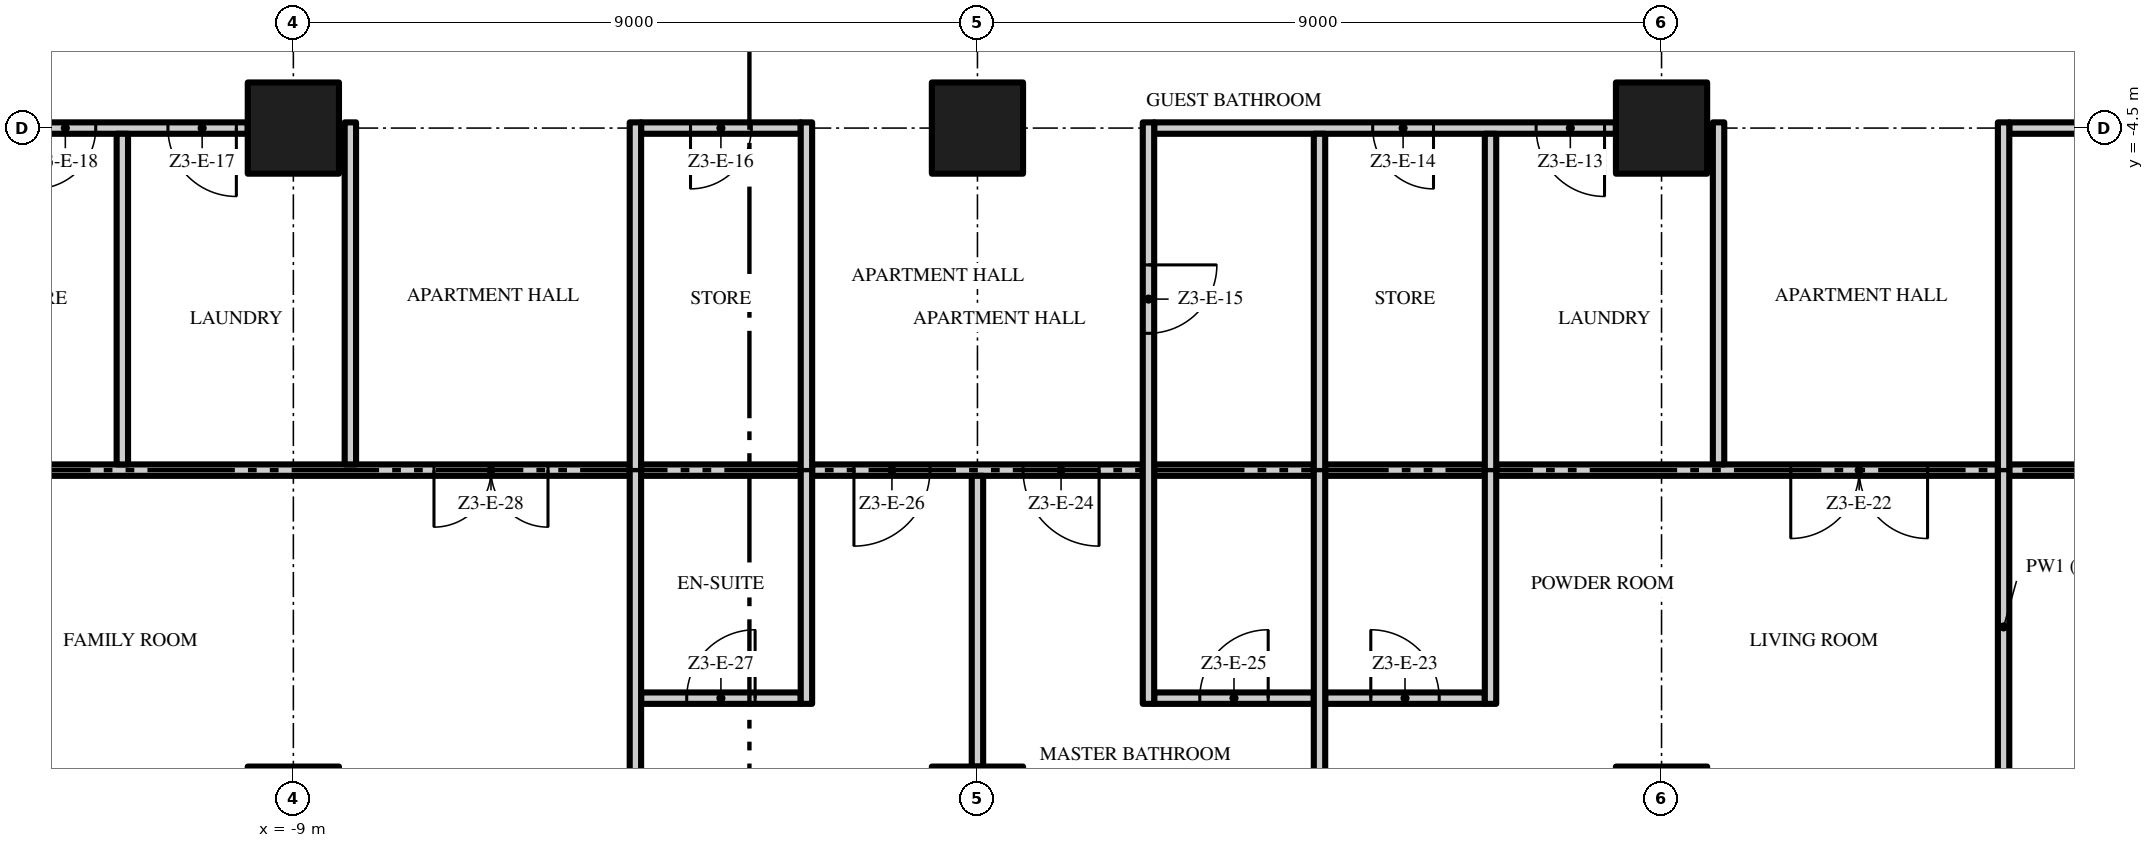
"""IFC4 building model, lengths in metres.
Left out: names, types, materials, properties, quantities, classifications, styles, units other than length and angle.
Written with IfcOpenShell. Run it as: python <this file> out.ifc"""

import sys

from ifc_helpers import new_model, si_unit, direction, frame, frame_2d, origin, origin_2d, place, context, subcontext, project, spatial, rectangle, extrude, element, fill, save


model = new_model("IFC4")
c1 = context("Model", 3, precision=1e-05, world=origin(), true_north=direction((0.0, 1.0)))
c2 = subcontext(c1, "Body", "Model", "MODEL_VIEW")
j1 = project(units=[si_unit("LENGTHUNIT", "METRE"), si_unit("PLANEANGLEUNIT", "RADIAN")], contexts=[c1])
p1 = place(None, origin())
s1 = spatial("IfcSite", under=j1, at=p1, CompositionType="ELEMENT")
p2 = place(p1, origin())
s2 = spatial("IfcBuilding", under=s1, at=p2, CompositionType="ELEMENT")
p3 = place(p2, frame((0.0, 0.0, 170.6)))
s3 = spatial("IfcBuildingStorey", under=s2, at=p3, CompositionType="ELEMENT", Elevation=170.6)
for number, where, z_axis, x_axis in (
    (1, (-9.0, -13.5, 0.0), (0.0, 0.0, 1.0), (1.0, 0.0, 0.0)),
    (2, (-9.0, -4.5, 0.0), (0.0, 0.0, 1.0), (1.0, 0.0, 0.0)),
    (3, (0.0, -13.5, 0.0), (0.0, 0.0, 1.0), (1.0, 0.0, 0.0)),
    (4, (0.0, -4.5, 0.0), (0.0, 0.0, 1.0), (1.0, 0.0, 0.0)),
    (5, (9.0, -13.5, 0.0), (0.0, 0.0, 1.0), (1.0, 0.0, 0.0)),
    (6, (9.0, -4.5, 0.0), (0.0, 0.0, 1.0), (1.0, 0.0, 0.0)),
):
    element("IfcColumn", number, at=place(p3, frame(where, z_axis=z_axis, x_axis=x_axis)), inside=s3, PredefinedType="COLUMN", context=c2, shape_type="SweptSolid", body=[
        extrude(rectangle(XDim=1.2, YDim=1.2, at=origin_2d()), origin(), (0.0, 0.0, 1.0), 3.5),
    ])
p4 = place(p3, frame((-4.425, -12.0, 0.0), z_axis=(0.0, 0.0, 1.0), x_axis=(1.0, 0.0, 0.0)))
e7 = element("IfcWall", 7, at=p4, inside=s3, PredefinedType="PARTITIONING", context=c2, shape_type="SweptSolid", body=[
    extrude(rectangle(XDim=2.1, YDim=0.15, at=frame_2d((1.05, 0.0))), origin(), (0.0, 0.0, 1.0), 3.5),
])
p5 = place(p4, frame((0.6, 0.0, 0.0)))
e8 = element("IfcOpeningElement", 8, at=p5, cuts=e7, PredefinedType="OPENING", context=c2, shape_type="SweptSolid", body=[
    extrude(rectangle(XDim=0.9, YDim=2.1, at=frame_2d((0.45, 1.05))), frame((0.0, 0.085, 0.0), z_axis=(0.0, -1.0, 0.0), x_axis=(1.0, 0.0, 0.0)), (0.0, 0.0, 1.0), 0.17),
])
p6 = place(p3, frame((2.325, -12.0, 0.0), z_axis=(0.0, 0.0, 1.0), x_axis=(1.0, 0.0, 0.0)))
e9 = element("IfcWall", 9, at=p6, inside=s3, PredefinedType="PARTITIONING", context=c2, shape_type="SweptSolid", body=[
    extrude(rectangle(XDim=2.1, YDim=0.15, at=frame_2d((1.05, 0.0))), origin(), (0.0, 0.0, 1.0), 3.5),
])
p7 = place(p6, frame((0.6, 0.0, 0.0)))
e10 = element("IfcOpeningElement", 10, at=p7, cuts=e9, PredefinedType="OPENING", context=c2, shape_type="SweptSolid", body=[
    extrude(rectangle(XDim=0.9, YDim=2.1, at=frame_2d((0.45, 1.05))), frame((0.0, 0.085, 0.0), z_axis=(0.0, -1.0, 0.0), x_axis=(1.0, 0.0, 0.0)), (0.0, 0.0, 1.0), 0.17),
])
p8 = place(p3, frame((4.575, -12.0, 0.0), z_axis=(0.0, 0.0, 1.0), x_axis=(1.0, 0.0, 0.0)))
e11 = element("IfcWall", 11, at=p8, inside=s3, PredefinedType="PARTITIONING", context=c2, shape_type="SweptSolid", body=[
    extrude(rectangle(XDim=2.1, YDim=0.15, at=frame_2d((1.05, 0.0))), origin(), (0.0, 0.0, 1.0), 3.5),
])
p9 = place(p8, frame((0.6, 0.0, 0.0)))
e12 = element("IfcOpeningElement", 12, at=p9, cuts=e11, PredefinedType="OPENING", context=c2, shape_type="SweptSolid", body=[
    extrude(rectangle(XDim=0.9, YDim=2.1, at=frame_2d((0.45, 1.05))), frame((0.0, 0.085, 0.0), z_axis=(0.0, -1.0, 0.0), x_axis=(1.0, 0.0, 0.0)), (0.0, 0.0, 1.0), 0.17),
])
p10 = place(p3, frame((-4.575, -9.0, 0.0), z_axis=(0.0, 0.0, 1.0), x_axis=(-1.0, 0.0, 0.0)))
e13 = element("IfcWall", 13, at=p10, inside=s3, PredefinedType="PARTITIONING", context=c2, shape_type="SweptSolid", body=[
    extrude(rectangle(XDim=8.85, YDim=0.15, at=frame_2d((4.425, 0.0))), origin(), (0.0, 0.0, 1.0), 3.5),
])
p11 = place(p10, frame((1.075, 0.0, 0.0)))
e14 = element("IfcOpeningElement", 14, at=p11, cuts=e13, PredefinedType="OPENING", context=c2, shape_type="SweptSolid", body=[
    extrude(rectangle(XDim=1.5, YDim=2.4, at=frame_2d((0.75, 1.2))), frame((0.0, 0.085, 0.0), z_axis=(0.0, -1.0, 0.0), x_axis=(1.0, 0.0, 0.0)), (0.0, 0.0, 1.0), 0.17),
])
p12 = place(p3, frame((-4.425, -9.0, 0.0), z_axis=(0.0, 0.0, 1.0), x_axis=(1.0, 0.0, 0.0)))
e15 = element("IfcWall", 15, at=p12, inside=s3, PredefinedType="PARTITIONING", context=c2, shape_type="SweptSolid", body=[
    extrude(rectangle(XDim=2.1, YDim=0.15, at=frame_2d((1.05, 0.0))), origin(), (0.0, 0.0, 1.0), 3.5),
])
p13 = place(p3, frame((2.175, -9.0, 0.0), z_axis=(0.0, 0.0, 1.0), x_axis=(-1.0, 0.0, 0.0)))
e16 = element("IfcWall", 16, at=p13, inside=s3, PredefinedType="PARTITIONING", context=c2, shape_type="SweptSolid", body=[
    extrude(rectangle(XDim=4.35, YDim=0.15, at=frame_2d((2.175, 0.0))), origin(), (0.0, 0.0, 1.0), 3.5),
])
p14 = place(p13, frame((0.575, 0.0, 0.0)))
e17 = element("IfcOpeningElement", 17, at=p14, cuts=e16, PredefinedType="OPENING", context=c2, shape_type="SweptSolid", body=[
    extrude(rectangle(XDim=1.0, YDim=2.4, at=frame_2d((0.5, 1.2))), frame((0.0, 0.085, 0.0), z_axis=(0.0, -1.0, 0.0), x_axis=(1.0, 0.0, 0.0)), (0.0, 0.0, 1.0), 0.17),
])
p15 = place(p13, frame((2.8, 0.0, 0.0)))
e18 = element("IfcOpeningElement", 18, at=p15, cuts=e16, PredefinedType="OPENING", context=c2, shape_type="SweptSolid", body=[
    extrude(rectangle(XDim=1.0, YDim=2.4, at=frame_2d((0.5, 1.2))), frame((0.0, 0.085, 0.0), z_axis=(0.0, -1.0, 0.0), x_axis=(1.0, 0.0, 0.0)), (0.0, 0.0, 1.0), 0.17),
])
for number, where, z_axis, x_axis in (
    (19, (2.325, -9.0, 0.0), (0.0, 0.0, 1.0), (1.0, 0.0, 0.0)),
    (20, (4.575, -9.0, 0.0), (0.0, 0.0, 1.0), (1.0, 0.0, 0.0)),
):
    element("IfcWall", number, at=place(p3, frame(where, z_axis=z_axis, x_axis=x_axis)), inside=s3, PredefinedType="PARTITIONING", context=c2, shape_type="SweptSolid", body=[
        extrude(rectangle(XDim=2.1, YDim=0.15, at=frame_2d((1.05, 0.0))), origin(), (0.0, 0.0, 1.0), 3.5),
    ])
p16 = place(p3, frame((13.425, -9.0, 0.0), z_axis=(0.0, 0.0, 1.0), x_axis=(-1.0, 0.0, 0.0)))
e21 = element("IfcWall", 21, at=p16, inside=s3, PredefinedType="PARTITIONING", context=c2, shape_type="SweptSolid", body=[
    extrude(rectangle(XDim=6.6, YDim=0.15, at=frame_2d((3.3, 0.0))), origin(), (0.0, 0.0, 1.0), 3.5),
])
p17 = place(p16, frame((0.925, 0.0, 0.0)))
e22 = element("IfcOpeningElement", 22, at=p17, cuts=e21, PredefinedType="OPENING", context=c2, shape_type="SweptSolid", body=[
    extrude(rectangle(XDim=1.8, YDim=2.4, at=frame_2d((0.9, 1.2))), frame((0.0, 0.085, 0.0), z_axis=(0.0, -1.0, 0.0), x_axis=(1.0, 0.0, 0.0)), (0.0, 0.0, 1.0), 0.17),
])
p18 = place(p3, frame((22.2, -9.0, 0.0), z_axis=(0.0, 0.0, 1.0), x_axis=(-1.0, 0.0, 0.0)))
e23 = element("IfcWall", 23, at=p18, inside=s3, PredefinedType="PARTITIONING", context=c2, shape_type="SweptSolid", body=[
    extrude(rectangle(XDim=8.625, YDim=0.15, at=frame_2d((4.312, 0.0))), origin(), (0.0, 0.0, 1.0), 3.5),
])
p19 = place(p18, frame((0.8, 0.0, 0.0)))
e24 = element("IfcOpeningElement", 24, at=p19, cuts=e23, PredefinedType="OPENING", context=c2, shape_type="SweptSolid", body=[
    extrude(rectangle(XDim=1.5, YDim=2.4, at=frame_2d((0.75, 1.2))), frame((0.0, 0.085, 0.0), z_axis=(0.0, -1.0, 0.0), x_axis=(1.0, 0.0, 0.0)), (0.0, 0.0, 1.0), 0.17),
])
p20 = place(p3, frame((-9.6, -4.5, 0.0), z_axis=(0.0, 0.0, 1.0), x_axis=(-1.0, 0.0, 0.0)))
e25 = element("IfcWall", 25, at=p20, inside=s3, PredefinedType="PARTITIONING", context=c2, shape_type="SweptSolid", body=[
    extrude(rectangle(XDim=3.825, YDim=0.15, at=frame_2d((1.913, 0.0))), origin(), (0.0, 0.0, 1.0), 3.5),
])
p21 = place(p20, frame((0.15, 0.0, 0.0)))
e26 = element("IfcOpeningElement", 26, at=p21, cuts=e25, PredefinedType="OPENING", context=c2, shape_type="SweptSolid", body=[
    extrude(rectangle(XDim=0.9, YDim=2.1, at=frame_2d((0.45, 1.05))), frame((0.0, 0.085, 0.0), z_axis=(0.0, -1.0, 0.0), x_axis=(1.0, 0.0, 0.0)), (0.0, 0.0, 1.0), 0.17),
])
p22 = place(p20, frame((2.0, 0.0, 0.0)))
e27 = element("IfcOpeningElement", 27, at=p22, cuts=e25, PredefinedType="OPENING", context=c2, shape_type="SweptSolid", body=[
    extrude(rectangle(XDim=0.8, YDim=2.0, at=frame_2d((0.4, 1.0))), frame((0.0, 0.085, 0.0), z_axis=(0.0, -1.0, 0.0), x_axis=(1.0, 0.0, 0.0)), (0.0, 0.0, 1.0), 0.17),
])
p23 = place(p3, frame((-2.325, -4.5, 0.0), z_axis=(0.0, 0.0, 1.0), x_axis=(-1.0, 0.0, 0.0)))
e28 = element("IfcWall", 28, at=p23, inside=s3, PredefinedType="PARTITIONING", context=c2, shape_type="SweptSolid", body=[
    extrude(rectangle(XDim=2.1, YDim=0.15, at=frame_2d((1.05, 0.0))), origin(), (0.0, 0.0, 1.0), 3.5),
])
p24 = place(p23, frame((0.65, 0.0, 0.0)))
e29 = element("IfcOpeningElement", 29, at=p24, cuts=e28, PredefinedType="OPENING", context=c2, shape_type="SweptSolid", body=[
    extrude(rectangle(XDim=0.8, YDim=2.0, at=frame_2d((0.4, 1.0))), frame((0.0, 0.085, 0.0), z_axis=(0.0, -1.0, 0.0), x_axis=(1.0, 0.0, 0.0)), (0.0, 0.0, 1.0), 0.17),
])
p25 = place(p3, frame((8.4, -4.5, 0.0), z_axis=(0.0, 0.0, 1.0), x_axis=(-1.0, 0.0, 0.0)))
e30 = element("IfcWall", 30, at=p25, inside=s3, PredefinedType="PARTITIONING", context=c2, shape_type="SweptSolid", body=[
    extrude(rectangle(XDim=6.075, YDim=0.15, at=frame_2d((3.038, 0.0))), origin(), (0.0, 0.0, 1.0), 3.5),
])
p26 = place(p25, frame((0.15, 0.0, 0.0)))
e31 = element("IfcOpeningElement", 31, at=p26, cuts=e30, PredefinedType="OPENING", context=c2, shape_type="SweptSolid", body=[
    extrude(rectangle(XDim=0.9, YDim=2.1, at=frame_2d((0.45, 1.05))), frame((0.0, 0.085, 0.0), z_axis=(0.0, -1.0, 0.0), x_axis=(1.0, 0.0, 0.0)), (0.0, 0.0, 1.0), 0.17),
])
p27 = place(p25, frame((2.4, 0.0, 0.0)))
e32 = element("IfcOpeningElement", 32, at=p27, cuts=e30, PredefinedType="OPENING", context=c2, shape_type="SweptSolid", body=[
    extrude(rectangle(XDim=0.8, YDim=2.0, at=frame_2d((0.4, 1.0))), frame((0.0, 0.085, 0.0), z_axis=(0.0, -1.0, 0.0), x_axis=(1.0, 0.0, 0.0)), (0.0, 0.0, 1.0), 0.17),
])
p28 = place(p3, frame((17.4, -4.5, 0.0), z_axis=(0.0, 0.0, 1.0), x_axis=(-1.0, 0.0, 0.0)))
e33 = element("IfcWall", 33, at=p28, inside=s3, PredefinedType="PARTITIONING", context=c2, shape_type="SweptSolid", body=[
    extrude(rectangle(XDim=3.825, YDim=0.15, at=frame_2d((1.913, 0.0))), origin(), (0.0, 0.0, 1.0), 3.5),
])
p29 = place(p28, frame((0.775, 0.0, 0.0)))
e34 = element("IfcOpeningElement", 34, at=p29, cuts=e33, PredefinedType="OPENING", context=c2, shape_type="SweptSolid", body=[
    extrude(rectangle(XDim=1.0, YDim=2.4, at=frame_2d((0.5, 1.2))), frame((0.0, 0.085, 0.0), z_axis=(0.0, -1.0, 0.0), x_axis=(1.0, 0.0, 0.0)), (0.0, 0.0, 1.0), 0.17),
])
p30 = place(p3, frame((-11.25, -8.925, 0.0), z_axis=(0.0, 0.0, 1.0), x_axis=(0.0, 1.0, 0.0)))
e35 = element("IfcWall", 35, at=p30, inside=s3, PredefinedType="PARTITIONING", context=c2, shape_type="SweptSolid", body=[
    extrude(rectangle(XDim=4.35, YDim=0.15, at=frame_2d((2.175, 0.0))), origin(), (0.0, 0.0, 1.0), 3.5),
])
p31 = place(p3, frame((-8.25, -8.925, 0.0), z_axis=(0.0, 0.0, 1.0), x_axis=(0.0, 1.0, 0.0)))
e36 = element("IfcWall", 36, at=p31, inside=s3, PredefinedType="PARTITIONING", context=c2, shape_type="SweptSolid", body=[
    extrude(rectangle(XDim=4.5, YDim=0.15, at=frame_2d((2.25, 0.0))), origin(), (0.0, 0.0, 1.0), 3.5),
])
p32 = place(p3, frame((-4.5, -17.7, 0.0), z_axis=(0.0, 0.0, 1.0), x_axis=(0.0, 1.0, 0.0)))
e37 = element("IfcWall", 37, at=p32, inside=s3, PredefinedType="PARTITIONING", context=c2, shape_type="SweptSolid", body=[
    extrude(rectangle(XDim=13.275, YDim=0.15, at=frame_2d((6.638, 0.0))), origin(), (0.0, 0.0, 1.0), 3.5),
])
p33 = place(p3, frame((-2.25, -12.075, 0.0), z_axis=(0.0, 0.0, 1.0), x_axis=(0.0, 1.0, 0.0)))
e38 = element("IfcWall", 38, at=p33, inside=s3, PredefinedType="PARTITIONING", context=c2, shape_type="SweptSolid", body=[
    extrude(rectangle(XDim=7.65, YDim=0.15, at=frame_2d((3.825, 0.0))), origin(), (0.0, 0.0, 1.0), 3.5),
])
p34 = place(p3, frame((0.0, -12.9, 0.0), z_axis=(0.0, 0.0, 1.0), x_axis=(0.0, 1.0, 0.0)))
e39 = element("IfcWall", 39, at=p34, inside=s3, PredefinedType="PARTITIONING", context=c2, shape_type="SweptSolid", body=[
    extrude(rectangle(XDim=3.825, YDim=0.15, at=frame_2d((1.913, 0.0))), origin(), (0.0, 0.0, 1.0), 3.5),
])
p35 = place(p3, frame((2.25, -4.425, 0.0), z_axis=(0.0, 0.0, 1.0), x_axis=(0.0, -1.0, 0.0)))
e40 = element("IfcWall", 40, at=p35, inside=s3, PredefinedType="PARTITIONING", context=c2, shape_type="SweptSolid", body=[
    extrude(rectangle(XDim=7.65, YDim=0.15, at=frame_2d((3.825, 0.0))), origin(), (0.0, 0.0, 1.0), 3.5),
])
p36 = place(p35, frame((1.875, 0.0, 0.0)))
e41 = element("IfcOpeningElement", 41, at=p36, cuts=e40, PredefinedType="OPENING", context=c2, shape_type="SweptSolid", body=[
    extrude(rectangle(XDim=0.9, YDim=2.1, at=frame_2d((0.45, 1.05))), frame((0.0, 0.085, 0.0), z_axis=(0.0, -1.0, 0.0), x_axis=(1.0, 0.0, 0.0)), (0.0, 0.0, 1.0), 0.17),
])
p37 = place(p3, frame((4.5, -17.7, 0.0), z_axis=(0.0, 0.0, 1.0), x_axis=(0.0, 1.0, 0.0)))
e42 = element("IfcWall", 42, at=p37, inside=s3, PredefinedType="PARTITIONING", context=c2, shape_type="SweptSolid", body=[
    extrude(rectangle(XDim=13.125, YDim=0.15, at=frame_2d((6.562, 0.0))), origin(), (0.0, 0.0, 1.0), 3.5),
])
p38 = place(p3, frame((6.75, -12.075, 0.0), z_axis=(0.0, 0.0, 1.0), x_axis=(0.0, 1.0, 0.0)))
e43 = element("IfcWall", 43, at=p38, inside=s3, PredefinedType="PARTITIONING", context=c2, shape_type="SweptSolid", body=[
    extrude(rectangle(XDim=7.5, YDim=0.15, at=frame_2d((3.75, 0.0))), origin(), (0.0, 0.0, 1.0), 3.5),
])
p39 = place(p3, frame((9.75, -8.925, 0.0), z_axis=(0.0, 0.0, 1.0), x_axis=(0.0, 1.0, 0.0)))
e44 = element("IfcWall", 44, at=p39, inside=s3, PredefinedType="PARTITIONING", context=c2, shape_type="SweptSolid", body=[
    extrude(rectangle(XDim=4.5, YDim=0.15, at=frame_2d((2.25, 0.0))), origin(), (0.0, 0.0, 1.0), 3.5),
])
p40 = place(p3, frame((13.5, -17.7, 0.0), z_axis=(0.0, 0.0, 1.0), x_axis=(0.0, 1.0, 0.0)))
e45 = element("IfcWall", 45, at=p40, inside=s3, PredefinedType="PARTITIONING", context=c2, shape_type="SweptSolid", body=[
    extrude(rectangle(XDim=13.275, YDim=0.15, at=frame_2d((6.638, 0.0))), origin(), (0.0, 0.0, 1.0), 3.5),
])
p41 = place(p26, origin())
e46 = element("IfcDoor", 46, at=p41, inside=s3, OperationType="SINGLE_SWING_LEFT", PredefinedType="DOOR", context=c2, shape_type="SweptSolid", body=[
    extrude(rectangle(XDim=0.9, YDim=2.1, at=frame_2d((0.45, 1.05))), frame((0.0, 0.025, 0.0), z_axis=(0.0, -1.0, 0.0), x_axis=(1.0, 0.0, 0.0)), (0.0, 0.0, 1.0), 0.05),
])
fill(e31, e46)
p42 = place(p27, origin())
e47 = element("IfcDoor", 47, at=p42, inside=s3, OperationType="SINGLE_SWING_LEFT", PredefinedType="DOOR", context=c2, shape_type="SweptSolid", body=[
    extrude(rectangle(XDim=0.8, YDim=2.0, at=frame_2d((0.4, 1.0))), frame((0.0, 0.025, 0.0), z_axis=(0.0, -1.0, 0.0), x_axis=(1.0, 0.0, 0.0)), (0.0, 0.0, 1.0), 0.05),
])
fill(e32, e47)
p43 = place(p36, origin())
e48 = element("IfcDoor", 48, at=p43, inside=s3, OperationType="SINGLE_SWING_LEFT", PredefinedType="DOOR", context=c2, shape_type="SweptSolid", body=[
    extrude(rectangle(XDim=0.9, YDim=2.1, at=frame_2d((0.45, 1.05))), frame((0.0, 0.025, 0.0), z_axis=(0.0, -1.0, 0.0), x_axis=(1.0, 0.0, 0.0)), (0.0, 0.0, 1.0), 0.05),
])
fill(e41, e48)
p44 = place(p24, origin())
e49 = element("IfcDoor", 49, at=p44, inside=s3, OperationType="SINGLE_SWING_RIGHT", PredefinedType="DOOR", context=c2, shape_type="SweptSolid", body=[
    extrude(rectangle(XDim=0.8, YDim=2.0, at=frame_2d((0.4, 1.0))), frame((0.0, 0.025, 0.0), z_axis=(0.0, -1.0, 0.0), x_axis=(1.0, 0.0, 0.0)), (0.0, 0.0, 1.0), 0.05),
])
fill(e29, e49)
p45 = place(p21, origin())
e50 = element("IfcDoor", 50, at=p45, inside=s3, OperationType="SINGLE_SWING_LEFT", PredefinedType="DOOR", context=c2, shape_type="SweptSolid", body=[
    extrude(rectangle(XDim=0.9, YDim=2.1, at=frame_2d((0.45, 1.05))), frame((0.0, 0.025, 0.0), z_axis=(0.0, -1.0, 0.0), x_axis=(1.0, 0.0, 0.0)), (0.0, 0.0, 1.0), 0.05),
])
fill(e26, e50)
p46 = place(p22, origin())
e51 = element("IfcDoor", 51, at=p46, inside=s3, OperationType="SINGLE_SWING_RIGHT", PredefinedType="DOOR", context=c2, shape_type="SweptSolid", body=[
    extrude(rectangle(XDim=0.8, YDim=2.0, at=frame_2d((0.4, 1.0))), frame((0.0, 0.025, 0.0), z_axis=(0.0, -1.0, 0.0), x_axis=(1.0, 0.0, 0.0)), (0.0, 0.0, 1.0), 0.05),
])
fill(e27, e51)
p47 = place(p17, origin())
e52 = element("IfcDoor", 52, at=p47, inside=s3, OperationType="DOUBLE_DOOR_SINGLE_SWING", PredefinedType="DOOR", context=c2, shape_type="SweptSolid", body=[
    extrude(rectangle(XDim=1.8, YDim=2.4, at=frame_2d((0.9, 1.2))), frame((0.0, 0.025, 0.0), z_axis=(0.0, -1.0, 0.0), x_axis=(1.0, 0.0, 0.0)), (0.0, 0.0, 1.0), 0.05),
])
fill(e22, e52)
p48 = place(p9, origin())
e53 = element("IfcDoor", 53, at=p48, inside=s3, OperationType="SINGLE_SWING_LEFT", PredefinedType="DOOR", context=c2, shape_type="SweptSolid", body=[
    extrude(rectangle(XDim=0.9, YDim=2.1, at=frame_2d((0.45, 1.05))), frame((0.0, 0.025, 0.0), z_axis=(0.0, -1.0, 0.0), x_axis=(1.0, 0.0, 0.0)), (0.0, 0.0, 1.0), 0.05),
])
fill(e12, e53)
p49 = place(p14, origin())
e54 = element("IfcDoor", 54, at=p49, inside=s3, OperationType="SINGLE_SWING_LEFT", PredefinedType="DOOR", context=c2, shape_type="SweptSolid", body=[
    extrude(rectangle(XDim=1.0, YDim=2.4, at=frame_2d((0.5, 1.2))), frame((0.0, 0.025, 0.0), z_axis=(0.0, -1.0, 0.0), x_axis=(1.0, 0.0, 0.0)), (0.0, 0.0, 1.0), 0.05),
])
fill(e17, e54)
p50 = place(p7, origin())
e55 = element("IfcDoor", 55, at=p50, inside=s3, OperationType="SINGLE_SWING_RIGHT", PredefinedType="DOOR", context=c2, shape_type="SweptSolid", body=[
    extrude(rectangle(XDim=0.9, YDim=2.1, at=frame_2d((0.45, 1.05))), frame((0.0, 0.025, 0.0), z_axis=(0.0, -1.0, 0.0), x_axis=(1.0, 0.0, 0.0)), (0.0, 0.0, 1.0), 0.05),
])
fill(e10, e55)
p51 = place(p15, origin())
e56 = element("IfcDoor", 56, at=p51, inside=s3, OperationType="SINGLE_SWING_RIGHT", PredefinedType="DOOR", context=c2, shape_type="SweptSolid", body=[
    extrude(rectangle(XDim=1.0, YDim=2.4, at=frame_2d((0.5, 1.2))), frame((0.0, 0.025, 0.0), z_axis=(0.0, -1.0, 0.0), x_axis=(1.0, 0.0, 0.0)), (0.0, 0.0, 1.0), 0.05),
])
fill(e18, e56)
p52 = place(p5, origin())
e57 = element("IfcDoor", 57, at=p52, inside=s3, OperationType="SINGLE_SWING_RIGHT", PredefinedType="DOOR", context=c2, shape_type="SweptSolid", body=[
    extrude(rectangle(XDim=0.9, YDim=2.1, at=frame_2d((0.45, 1.05))), frame((0.0, 0.025, 0.0), z_axis=(0.0, -1.0, 0.0), x_axis=(1.0, 0.0, 0.0)), (0.0, 0.0, 1.0), 0.05),
])
fill(e8, e57)
p53 = place(p11, origin())
e58 = element("IfcDoor", 58, at=p53, inside=s3, OperationType="DOUBLE_DOOR_SINGLE_SWING", PredefinedType="DOOR", context=c2, shape_type="SweptSolid", body=[
    extrude(rectangle(XDim=1.5, YDim=2.4, at=frame_2d((0.75, 1.2))), frame((0.0, 0.025, 0.0), z_axis=(0.0, -1.0, 0.0), x_axis=(1.0, 0.0, 0.0)), (0.0, 0.0, 1.0), 0.05),
])
fill(e14, e58)
save(model, sys.argv[1])
